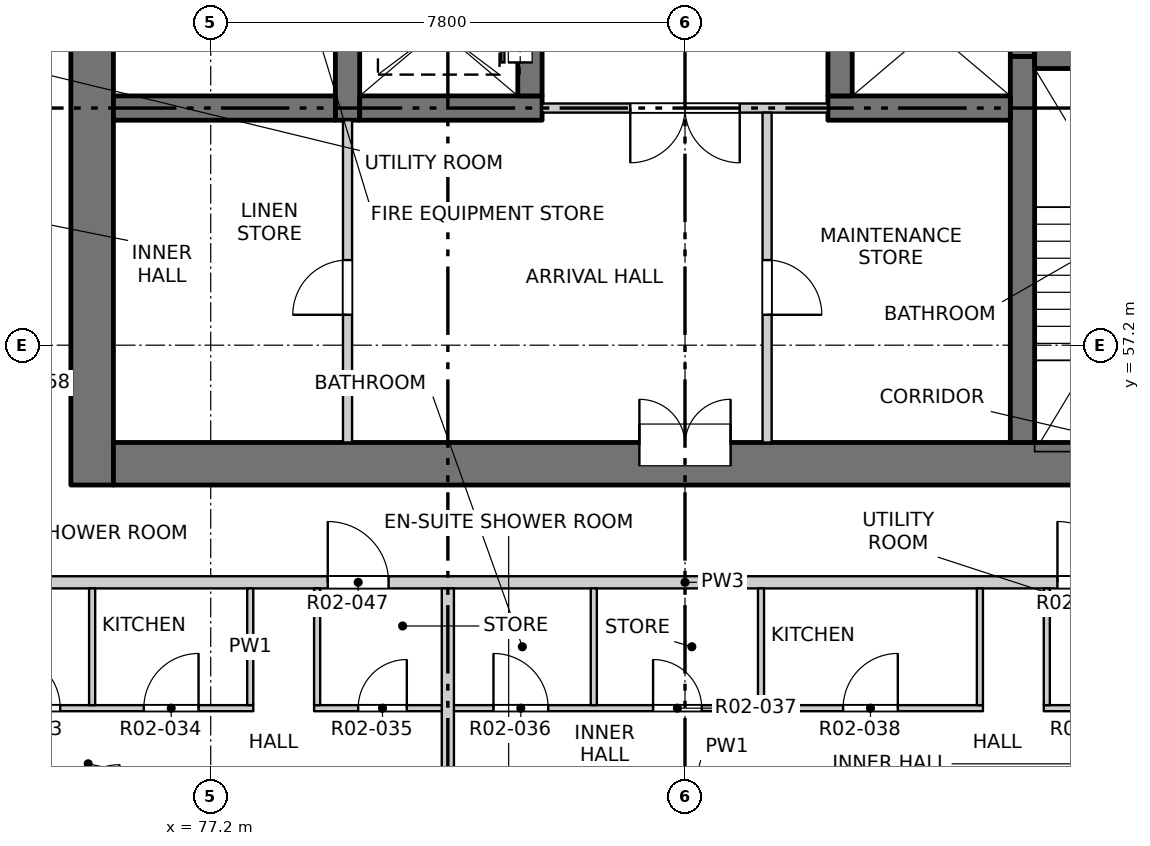
"""IFC4 building model, lengths in metres.
Left out: names, types, materials, properties, quantities, classifications, styles, units other than length and angle.
Written with IfcOpenShell. Run it as: python <this file> out.ifc"""

import sys

from ifc_helpers import new_model, si_unit, direction, frame, frame_2d, origin, place, context, subcontext, project, spatial, rectangle, extrude, element, fill, save


model = new_model("IFC4")
c1 = context("Model", 3, precision=1e-05, world=origin(), true_north=direction((0.0, 1.0)))
c2 = subcontext(c1, "Body", "Model", "MODEL_VIEW")
j1 = project(units=[si_unit("LENGTHUNIT", "METRE"), si_unit("PLANEANGLEUNIT", "RADIAN")], contexts=[c1])
p1 = place(None, origin())
s1 = spatial("IfcSite", under=j1, at=p1, CompositionType="ELEMENT")
p2 = place(p1, origin())
s2 = spatial("IfcBuilding", under=s1, at=p2, CompositionType="ELEMENT")
p3 = place(p2, frame((0.0, 0.0, 36.5)))
s3 = spatial("IfcBuildingStorey", under=s2, at=p3, CompositionType="ELEMENT", Elevation=36.5)
p4 = place(p3, frame((75.25, 54.9, -0.25), z_axis=(0.0, 0.0, 1.0), x_axis=(0.0, 1.0, 0.0)))
e1 = element("IfcWall", 1, at=p4, inside=s3, PredefinedType="SOLIDWALL", context=c2, shape_type="SweptSolid", body=[
    extrude(rectangle(XDim=22.4, YDim=0.7, at=frame_2d((11.2, 0.0))), origin(), (0.0, 0.0, 1.0), 3.4),
])
p5 = place(p4, frame((7.55, 0.0, 0.25)))
e2 = element("IfcOpeningElement", 2, at=p5, cuts=e1, PredefinedType="OPENING", context=c2, shape_type="SweptSolid", body=[
    extrude(rectangle(XDim=0.9, YDim=2.1, at=frame_2d((0.45, 1.05))), frame((0.0, 0.36, 0.0), z_axis=(0.0, -1.0, 0.0), x_axis=(1.0, 0.0, 0.0)), (0.0, 0.0, 1.0), 0.72),
])
p6 = place(p4, frame((10.85, 0.0, 0.25)))
e3 = element("IfcOpeningElement", 3, at=p6, cuts=e1, PredefinedType="OPENING", context=c2, shape_type="SweptSolid", body=[
    extrude(rectangle(XDim=0.9, YDim=2.1, at=frame_2d((0.45, 1.05))), frame((0.0, 0.36, 0.0), z_axis=(0.0, -1.0, 0.0), x_axis=(1.0, 0.0, 0.0)), (0.0, 0.0, 1.0), 0.72),
])
p7 = place(p4, frame((13.85, 0.0, 0.25)))
e4 = element("IfcOpeningElement", 4, at=p7, cuts=e1, PredefinedType="OPENING", context=c2, shape_type="SweptSolid", body=[
    extrude(rectangle(XDim=0.9, YDim=2.1, at=frame_2d((0.45, 1.05))), frame((0.0, 0.36, 0.0), z_axis=(0.0, -1.0, 0.0), x_axis=(1.0, 0.0, 0.0)), (0.0, 0.0, 1.0), 0.72),
])
p8 = place(p4, frame((16.85, 0.0, 0.25)))
e5 = element("IfcOpeningElement", 5, at=p8, cuts=e1, PredefinedType="OPENING", context=c2, shape_type="SweptSolid", body=[
    extrude(rectangle(XDim=0.9, YDim=2.1, at=frame_2d((0.45, 1.05))), frame((0.0, 0.36, 0.0), z_axis=(0.0, -1.0, 0.0), x_axis=(1.0, 0.0, 0.0)), (0.0, 0.0, 1.0), 0.72),
])
p9 = place(p4, frame((20.15, 0.0, 0.25)))
e6 = element("IfcOpeningElement", 6, at=p9, cuts=e1, PredefinedType="OPENING", context=c2, shape_type="SweptSolid", body=[
    extrude(rectangle(XDim=0.9, YDim=2.1, at=frame_2d((0.45, 1.05))), frame((0.0, 0.36, 0.0), z_axis=(0.0, -1.0, 0.0), x_axis=(1.0, 0.0, 0.0)), (0.0, 0.0, 1.0), 0.72),
])
p10 = place(p3, frame((75.6, 55.25, -0.25), z_axis=(0.0, 0.0, 1.0), x_axis=(1.0, 0.0, 0.0)))
e7 = element("IfcWall", 7, at=p10, inside=s3, PredefinedType="SOLIDWALL", context=c2, shape_type="SweptSolid", body=[
    extrude(rectangle(XDim=18.8, YDim=0.7, at=frame_2d((9.4, 0.0))), origin(), (0.0, 0.0, 1.0), 3.4),
])
p11 = place(p10, frame((8.65, 0.0, 0.25)))
e8 = element("IfcOpeningElement", 8, at=p11, cuts=e7, PredefinedType="OPENING", context=c2, shape_type="SweptSolid", body=[
    extrude(rectangle(XDim=1.5, YDim=2.1, at=frame_2d((0.75, 1.05))), frame((0.0, 0.36, 0.0), z_axis=(0.0, -1.0, 0.0), x_axis=(1.0, 0.0, 0.0)), (0.0, 0.0, 1.0), 0.72),
])
p12 = place(p3, frame((79.45, 60.9, -0.25), z_axis=(0.0, 0.0, 1.0), x_axis=(0.0, 1.0, 0.0)))
e9 = element("IfcWall", 9, at=p12, inside=s3, PredefinedType="SOLIDWALL", context=c2, shape_type="SweptSolid", body=[
    extrude(rectangle(XDim=16.4, YDim=0.4, at=frame_2d((8.2, 0.0))), origin(), (0.0, 0.0, 1.0), 3.4),
])
p13 = place(p3, frame((90.55, 55.6, -0.25), z_axis=(0.0, 0.0, 1.0), x_axis=(0.0, 1.0, 0.0)))
e10 = element("IfcWall", 10, at=p13, inside=s3, PredefinedType="SOLIDWALL", context=c2, shape_type="SweptSolid", body=[
    extrude(rectangle(XDim=6.35, YDim=0.4, at=frame_2d((3.175, 0.0))), origin(), (0.0, 0.0, 1.0), 3.4),
])
p14 = place(p3, frame((90.55, 61.95, -0.25), z_axis=(0.0, 0.0, 1.0), x_axis=(0.0, 1.0, 0.0)))
e11 = element("IfcWall", 11, at=p14, inside=s3, PredefinedType="SOLIDWALL", context=c2, shape_type="SweptSolid", body=[
    extrude(rectangle(XDim=15.35, YDim=0.4, at=frame_2d((7.675, 0.0))), origin(), (0.0, 0.0, 1.0), 3.4),
])
p15 = place(p3, frame((79.65, 61.1, -0.25), z_axis=(0.0, 0.0, 1.0), x_axis=(1.0, 0.0, 0.0)))
e12 = element("IfcWall", 12, at=p15, inside=s3, PredefinedType="SOLIDWALL", context=c2, shape_type="SweptSolid", body=[
    extrude(rectangle(XDim=3.0, YDim=0.4, at=frame_2d((1.5, 0.0))), origin(), (0.0, 0.0, 1.0), 3.4),
])
p16 = place(p3, frame((82.45, 61.3, -0.25), z_axis=(0.0, 0.0, 1.0), x_axis=(0.0, 1.0, 0.0)))
e13 = element("IfcWall", 13, at=p16, inside=s3, PredefinedType="SOLIDWALL", context=c2, shape_type="SweptSolid", body=[
    extrude(rectangle(XDim=2.2, YDim=0.4, at=frame_2d((1.1, 0.0))), origin(), (0.0, 0.0, 1.0), 3.4),
])
p17 = place(p16, frame((0.55, 0.0, 0.25)))
e14 = element("IfcOpeningElement", 14, at=p17, cuts=e13, PredefinedType="OPENING", context=c2, shape_type="SweptSolid", body=[
    extrude(rectangle(XDim=1.1, YDim=2.1, at=frame_2d((0.55, 1.05))), frame((0.0, 0.21, 0.0), z_axis=(0.0, -1.0, 0.0), x_axis=(1.0, 0.0, 0.0)), (0.0, 0.0, 1.0), 0.42),
])
p18 = place(p3, frame((87.35, 61.1, -0.25), z_axis=(0.0, 0.0, 1.0), x_axis=(1.0, 0.0, 0.0)))
e15 = element("IfcWall", 15, at=p18, inside=s3, PredefinedType="SOLIDWALL", context=c2, shape_type="SweptSolid", body=[
    extrude(rectangle(XDim=3.0, YDim=0.4, at=frame_2d((1.5, 0.0))), origin(), (0.0, 0.0, 1.0), 3.4),
])
p19 = place(p3, frame((87.55, 61.3, -0.25), z_axis=(0.0, 0.0, 1.0), x_axis=(0.0, 1.0, 0.0)))
e16 = element("IfcWall", 16, at=p19, inside=s3, PredefinedType="SOLIDWALL", context=c2, shape_type="SweptSolid", body=[
    extrude(rectangle(XDim=2.2, YDim=0.4, at=frame_2d((1.1, 0.0))), origin(), (0.0, 0.0, 1.0), 3.4),
])
for number, where, z_axis, x_axis in (
    (17, (75.6, 61.1, -0.25), (0.0, 0.0, 1.0), (1.0, 0.0, 0.0)),
    (18, (90.75, 61.95, -0.25), (0.0, 0.0, 1.0), (1.0, 0.0, 0.0)),
):
    element("IfcWall", number, at=place(p3, frame(where, z_axis=z_axis, x_axis=x_axis)), inside=s3, PredefinedType="SOLIDWALL", context=c2, shape_type="SweptSolid", body=[
        extrude(rectangle(XDim=3.65, YDim=0.4, at=frame_2d((1.825, 0.0))), origin(), (0.0, 0.0, 1.0), 3.4),
    ])
p20 = place(p3, frame((73.2, 51.23, 0.0), z_axis=(0.0, 0.0, 1.0), x_axis=(1.0, 0.0, 0.0)))
e19 = element("IfcWall", 19, at=p20, inside=s3, PredefinedType="PARTITIONING", context=c2, shape_type="SweptSolid", body=[
    extrude(rectangle(XDim=4.7, YDim=0.1, at=frame_2d((2.35, 0.0))), origin(), (0.0, 0.0, 1.0), 3.15),
])
p21 = place(p20, frame((0.625, 0.0, 0.0)))
e20 = element("IfcOpeningElement", 20, at=p21, cuts=e19, PredefinedType="OPENING", context=c2, shape_type="SweptSolid", body=[
    extrude(rectangle(XDim=0.9, YDim=2.1, at=frame_2d((0.45, 1.05))), frame((0.0, 0.06, 0.0), z_axis=(0.0, -1.0, 0.0), x_axis=(1.0, 0.0, 0.0)), (0.0, 0.0, 1.0), 0.12),
])
p22 = place(p20, frame((2.9, 0.0, 0.0)))
e21 = element("IfcOpeningElement", 21, at=p22, cuts=e19, PredefinedType="OPENING", context=c2, shape_type="SweptSolid", body=[
    extrude(rectangle(XDim=0.9, YDim=2.1, at=frame_2d((0.45, 1.05))), frame((0.0, 0.06, 0.0), z_axis=(0.0, -1.0, 0.0), x_axis=(1.0, 0.0, 0.0)), (0.0, 0.0, 1.0), 0.12),
])
p23 = place(p3, frame((78.9, 51.23, 0.0), z_axis=(0.0, 0.0, 1.0), x_axis=(1.0, 0.0, 0.0)))
e22 = element("IfcWall", 22, at=p23, inside=s3, PredefinedType="PARTITIONING", context=c2, shape_type="SweptSolid", body=[
    extrude(rectangle(XDim=11.0, YDim=0.1, at=frame_2d((5.5, 0.0))), origin(), (0.0, 0.0, 1.0), 3.15),
])
p24 = place(p23, frame((0.725, 0.0, 0.0)))
e23 = element("IfcOpeningElement", 23, at=p24, cuts=e22, PredefinedType="OPENING", context=c2, shape_type="SweptSolid", body=[
    extrude(rectangle(XDim=0.8, YDim=2.1, at=frame_2d((0.4, 1.05))), frame((0.0, 0.06, 0.0), z_axis=(0.0, -1.0, 0.0), x_axis=(1.0, 0.0, 0.0)), (0.0, 0.0, 1.0), 0.12),
])
p25 = place(p23, frame((2.95, 0.0, 0.0)))
e24 = element("IfcOpeningElement", 24, at=p25, cuts=e22, PredefinedType="OPENING", context=c2, shape_type="SweptSolid", body=[
    extrude(rectangle(XDim=0.9, YDim=2.1, at=frame_2d((0.45, 1.05))), frame((0.0, 0.06, 0.0), z_axis=(0.0, -1.0, 0.0), x_axis=(1.0, 0.0, 0.0)), (0.0, 0.0, 1.0), 0.12),
])
p26 = place(p23, frame((5.575, 0.0, 0.0)))
e25 = element("IfcOpeningElement", 25, at=p26, cuts=e22, PredefinedType="OPENING", context=c2, shape_type="SweptSolid", body=[
    extrude(rectangle(XDim=0.8, YDim=2.1, at=frame_2d((0.4, 1.05))), frame((0.0, 0.06, 0.0), z_axis=(0.0, -1.0, 0.0), x_axis=(1.0, 0.0, 0.0)), (0.0, 0.0, 1.0), 0.12),
])
p27 = place(p23, frame((8.7, 0.0, 0.0)))
e26 = element("IfcOpeningElement", 26, at=p27, cuts=e22, PredefinedType="OPENING", context=c2, shape_type="SweptSolid", body=[
    extrude(rectangle(XDim=0.9, YDim=2.1, at=frame_2d((0.45, 1.05))), frame((0.0, 0.06, 0.0), z_axis=(0.0, -1.0, 0.0), x_axis=(1.0, 0.0, 0.0)), (0.0, 0.0, 1.0), 0.12),
])
p28 = place(p3, frame((90.9, 51.23, 0.0), z_axis=(0.0, 0.0, 1.0), x_axis=(1.0, 0.0, 0.0)))
e27 = element("IfcWall", 27, at=p28, inside=s3, PredefinedType="PARTITIONING", context=c2, shape_type="SweptSolid", body=[
    extrude(rectangle(XDim=5.9, YDim=0.1, at=frame_2d((2.95, 0.0))), origin(), (0.0, 0.0, 1.0), 3.15),
])
p29 = place(p28, frame((0.5, 0.0, 0.0)))
e28 = element("IfcOpeningElement", 28, at=p29, cuts=e27, PredefinedType="OPENING", context=c2, shape_type="SweptSolid", body=[
    extrude(rectangle(XDim=0.9, YDim=2.1, at=frame_2d((0.45, 1.05))), frame((0.0, 0.06, 0.0), z_axis=(0.0, -1.0, 0.0), x_axis=(1.0, 0.0, 0.0)), (0.0, 0.0, 1.0), 0.12),
])
p30 = place(p28, frame((2.375, 0.0, 0.0)))
e29 = element("IfcOpeningElement", 29, at=p30, cuts=e27, PredefinedType="OPENING", context=c2, shape_type="SweptSolid", body=[
    extrude(rectangle(XDim=0.8, YDim=2.1, at=frame_2d((0.4, 1.05))), frame((0.0, 0.06, 0.0), z_axis=(0.0, -1.0, 0.0), x_axis=(1.0, 0.0, 0.0)), (0.0, 0.0, 1.0), 0.12),
])
p31 = place(p28, frame((4.35, 0.0, 0.0)))
e30 = element("IfcOpeningElement", 30, at=p31, cuts=e27, PredefinedType="OPENING", context=c2, shape_type="SweptSolid", body=[
    extrude(rectangle(XDim=0.8, YDim=2.1, at=frame_2d((0.4, 1.05))), frame((0.0, 0.06, 0.0), z_axis=(0.0, -1.0, 0.0), x_axis=(1.0, 0.0, 0.0)), (0.0, 0.0, 1.0), 0.12),
])
p32 = place(p3, frame((73.2, 53.3, 0.0), z_axis=(0.0, 0.0, 1.0), x_axis=(1.0, 0.0, 0.0)))
e31 = element("IfcWall", 31, at=p32, inside=s3, PredefinedType="PARTITIONING", context=c2, shape_type="SweptSolid", body=[
    extrude(rectangle(XDim=23.6, YDim=0.2, at=frame_2d((11.8, 0.0))), origin(), (0.0, 0.0, 1.0), 3.15),
])
p33 = place(p32, frame((5.925, 0.0, 0.0)))
e32 = element("IfcOpeningElement", 32, at=p33, cuts=e31, PredefinedType="OPENING", context=c2, shape_type="SweptSolid", body=[
    extrude(rectangle(XDim=1.0, YDim=2.1, at=frame_2d((0.5, 1.05))), frame((0.0, 0.11, 0.0), z_axis=(0.0, -1.0, 0.0), x_axis=(1.0, 0.0, 0.0)), (0.0, 0.0, 1.0), 0.22),
])
p34 = place(p32, frame((17.925, 0.0, 0.0)))
e33 = element("IfcOpeningElement", 33, at=p34, cuts=e31, PredefinedType="OPENING", context=c2, shape_type="SweptSolid", body=[
    extrude(rectangle(XDim=1.0, YDim=2.1, at=frame_2d((0.5, 1.05))), frame((0.0, 0.11, 0.0), z_axis=(0.0, -1.0, 0.0), x_axis=(1.0, 0.0, 0.0)), (0.0, 0.0, 1.0), 0.22),
])
p35 = place(p3, frame((82.65, 61.1, 0.0), z_axis=(0.0, 0.0, 1.0), x_axis=(1.0, 0.0, 0.0)))
e34 = element("IfcWall", 34, at=p35, inside=s3, PredefinedType="PARTITIONING", context=c2, shape_type="SweptSolid", body=[
    extrude(rectangle(XDim=4.7, YDim=0.15, at=frame_2d((2.35, 0.0))), origin(), (0.0, 0.0, 1.0), 3.15),
])
p36 = place(p35, frame((1.45, 0.0, 0.0)))
e35 = element("IfcOpeningElement", 35, at=p36, cuts=e34, PredefinedType="OPENING", context=c2, shape_type="SweptSolid", body=[
    extrude(rectangle(XDim=1.8, YDim=2.1, at=frame_2d((0.9, 1.05))), frame((0.0, 0.085, 0.0), z_axis=(0.0, -1.0, 0.0), x_axis=(1.0, 0.0, 0.0)), (0.0, 0.0, 1.0), 0.17),
])
for number, where, z_axis, x_axis in (
    (36, (75.25, 51.28, 0.0), (0.0, 0.0, 1.0), (0.0, 1.0, 0.0)),
    (37, (77.85, 51.28, 0.0), (0.0, 0.0, 1.0), (0.0, 1.0, 0.0)),
    (38, (78.95, 51.28, 0.0), (0.0, 0.0, 1.0), (0.0, 1.0, 0.0)),
):
    element("IfcWall", number, at=place(p3, frame(where, z_axis=z_axis, x_axis=x_axis)), inside=s3, PredefinedType="PARTITIONING", context=c2, shape_type="SweptSolid", body=[
        extrude(rectangle(XDim=1.92, YDim=0.1, at=frame_2d((0.96, 0.0))), origin(), (0.0, 0.0, 1.0), 3.15),
    ])
p37 = place(p3, frame((79.45, 55.6, 0.0), z_axis=(0.0, 0.0, 1.0), x_axis=(0.0, 1.0, 0.0)))
e39 = element("IfcWall", 39, at=p37, inside=s3, PredefinedType="PARTITIONING", context=c2, shape_type="SweptSolid", body=[
    extrude(rectangle(XDim=5.3, YDim=0.15, at=frame_2d((2.65, 0.0))), origin(), (0.0, 0.0, 1.0), 3.15),
])
p38 = place(p37, frame((2.1, 0.0, 0.0)))
e40 = element("IfcOpeningElement", 40, at=p38, cuts=e39, PredefinedType="OPENING", context=c2, shape_type="SweptSolid", body=[
    extrude(rectangle(XDim=0.9, YDim=2.1, at=frame_2d((0.45, 1.05))), frame((0.0, 0.085, 0.0), z_axis=(0.0, -1.0, 0.0), x_axis=(1.0, 0.0, 0.0)), (0.0, 0.0, 1.0), 0.17),
])
p39 = place(p3, frame((81.1, 41.9, 0.0), z_axis=(0.0, 0.0, 1.0), x_axis=(0.0, 1.0, 0.0)))
e41 = element("IfcWall", 41, at=p39, inside=s3, PredefinedType="PARTITIONING", context=c2, shape_type="SweptSolid", body=[
    extrude(rectangle(XDim=11.3, YDim=0.2, at=frame_2d((5.65, 0.0))), origin(), (0.0, 0.0, 1.0), 3.15),
])
for number, where, z_axis, x_axis in (
    (42, (83.5, 51.28, 0.0), (0.0, 0.0, 1.0), (0.0, 1.0, 0.0)),
    (43, (86.25, 51.28, 0.0), (0.0, 0.0, 1.0), (0.0, 1.0, 0.0)),
):
    element("IfcWall", number, at=place(p3, frame(where, z_axis=z_axis, x_axis=x_axis)), inside=s3, PredefinedType="PARTITIONING", context=c2, shape_type="SweptSolid", body=[
        extrude(rectangle(XDim=1.92, YDim=0.1, at=frame_2d((0.96, 0.0))), origin(), (0.0, 0.0, 1.0), 3.15),
    ])
p40 = place(p3, frame((86.35, 55.6, 0.0), z_axis=(0.0, 0.0, 1.0), x_axis=(0.0, 1.0, 0.0)))
e44 = element("IfcWall", 44, at=p40, inside=s3, PredefinedType="PARTITIONING", context=c2, shape_type="SweptSolid", body=[
    extrude(rectangle(XDim=5.425, YDim=0.15, at=frame_2d((2.712, 0.0))), origin(), (0.0, 0.0, 1.0), 3.15),
])
p41 = place(p40, frame((2.1, 0.0, 0.0)))
e45 = element("IfcOpeningElement", 45, at=p41, cuts=e44, PredefinedType="OPENING", context=c2, shape_type="SweptSolid", body=[
    extrude(rectangle(XDim=0.9, YDim=2.1, at=frame_2d((0.45, 1.05))), frame((0.0, 0.085, 0.0), z_axis=(0.0, -1.0, 0.0), x_axis=(1.0, 0.0, 0.0)), (0.0, 0.0, 1.0), 0.17),
])
for number, where, z_axis, x_axis in (
    (46, (89.85, 51.28, 0.0), (0.0, 0.0, 1.0), (0.0, 1.0, 0.0)),
    (47, (90.95, 51.28, 0.0), (0.0, 0.0, 1.0), (0.0, 1.0, 0.0)),
):
    element("IfcWall", number, at=place(p3, frame(where, z_axis=z_axis, x_axis=x_axis)), inside=s3, PredefinedType="PARTITIONING", context=c2, shape_type="SweptSolid", body=[
        extrude(rectangle(XDim=1.92, YDim=0.1, at=frame_2d((0.96, 0.0))), origin(), (0.0, 0.0, 1.0), 3.15),
    ])
p42 = place(p21, origin())
e48 = element("IfcDoor", 48, at=p42, inside=s3, OperationType="SINGLE_SWING_LEFT", PredefinedType="DOOR", context=c2, shape_type="SweptSolid", body=[
    extrude(rectangle(XDim=0.9, YDim=2.1, at=frame_2d((0.45, 1.05))), frame((0.0, 0.025, 0.0), z_axis=(0.0, -1.0, 0.0), x_axis=(1.0, 0.0, 0.0)), (0.0, 0.0, 1.0), 0.05),
])
fill(e20, e48)
p43 = place(p22, origin())
e49 = element("IfcDoor", 49, at=p43, inside=s3, OperationType="SINGLE_SWING_RIGHT", PredefinedType="DOOR", context=c2, shape_type="SweptSolid", body=[
    extrude(rectangle(XDim=0.9, YDim=2.1, at=frame_2d((0.45, 1.05))), frame((0.0, 0.025, 0.0), z_axis=(0.0, -1.0, 0.0), x_axis=(1.0, 0.0, 0.0)), (0.0, 0.0, 1.0), 0.05),
])
fill(e21, e49)
p44 = place(p24, origin())
e50 = element("IfcDoor", 50, at=p44, inside=s3, OperationType="SINGLE_SWING_RIGHT", PredefinedType="DOOR", context=c2, shape_type="SweptSolid", body=[
    extrude(rectangle(XDim=0.8, YDim=2.1, at=frame_2d((0.4, 1.05))), frame((0.0, 0.025, 0.0), z_axis=(0.0, -1.0, 0.0), x_axis=(1.0, 0.0, 0.0)), (0.0, 0.0, 1.0), 0.05),
])
fill(e23, e50)
p45 = place(p25, origin())
e51 = element("IfcDoor", 51, at=p45, inside=s3, OperationType="SINGLE_SWING_LEFT", PredefinedType="DOOR", context=c2, shape_type="SweptSolid", body=[
    extrude(rectangle(XDim=0.9, YDim=2.1, at=frame_2d((0.45, 1.05))), frame((0.0, 0.025, 0.0), z_axis=(0.0, -1.0, 0.0), x_axis=(1.0, 0.0, 0.0)), (0.0, 0.0, 1.0), 0.05),
])
fill(e24, e51)
p46 = place(p26, origin())
e52 = element("IfcDoor", 52, at=p46, inside=s3, OperationType="SINGLE_SWING_LEFT", PredefinedType="DOOR", context=c2, shape_type="SweptSolid", body=[
    extrude(rectangle(XDim=0.8, YDim=2.1, at=frame_2d((0.4, 1.05))), frame((0.0, 0.025, 0.0), z_axis=(0.0, -1.0, 0.0), x_axis=(1.0, 0.0, 0.0)), (0.0, 0.0, 1.0), 0.05),
])
fill(e25, e52)
p47 = place(p27, origin())
e53 = element("IfcDoor", 53, at=p47, inside=s3, OperationType="SINGLE_SWING_RIGHT", PredefinedType="DOOR", context=c2, shape_type="SweptSolid", body=[
    extrude(rectangle(XDim=0.9, YDim=2.1, at=frame_2d((0.45, 1.05))), frame((0.0, 0.025, 0.0), z_axis=(0.0, -1.0, 0.0), x_axis=(1.0, 0.0, 0.0)), (0.0, 0.0, 1.0), 0.05),
])
fill(e26, e53)
p48 = place(p33, origin())
e54 = element("IfcDoor", 54, at=p48, inside=s3, OperationType="SINGLE_SWING_LEFT", PredefinedType="DOOR", context=c2, shape_type="SweptSolid", body=[
    extrude(rectangle(XDim=1.0, YDim=2.1, at=frame_2d((0.5, 1.05))), frame((0.0, 0.025, 0.0), z_axis=(0.0, -1.0, 0.0), x_axis=(1.0, 0.0, 0.0)), (0.0, 0.0, 1.0), 0.05),
])
fill(e32, e54)
p49 = place(p34, origin())
e55 = element("IfcDoor", 55, at=p49, inside=s3, OperationType="SINGLE_SWING_LEFT", PredefinedType="DOOR", context=c2, shape_type="SweptSolid", body=[
    extrude(rectangle(XDim=1.0, YDim=2.1, at=frame_2d((0.5, 1.05))), frame((0.0, 0.025, 0.0), z_axis=(0.0, -1.0, 0.0), x_axis=(1.0, 0.0, 0.0)), (0.0, 0.0, 1.0), 0.05),
])
fill(e33, e55)
p50 = place(p11, origin())
e56 = element("IfcDoor", 56, at=p50, inside=s3, OperationType="DOUBLE_DOOR_SINGLE_SWING", PredefinedType="DOOR", context=c2, shape_type="SweptSolid", body=[
    extrude(rectangle(XDim=1.5, YDim=2.1, at=frame_2d((0.75, 1.05))), frame((0.0, 0.335, 0.0), z_axis=(0.0, -1.0, 0.0), x_axis=(1.0, 0.0, 0.0)), (0.0, 0.0, 1.0), 0.05),
])
fill(e8, e56)
p51 = place(p38, origin())
e57 = element("IfcDoor", 57, at=p51, inside=s3, OperationType="SINGLE_SWING_LEFT", PredefinedType="DOOR", context=c2, shape_type="SweptSolid", body=[
    extrude(rectangle(XDim=0.9, YDim=2.1, at=frame_2d((0.45, 1.05))), frame((0.0, 0.025, 0.0), z_axis=(0.0, -1.0, 0.0), x_axis=(1.0, 0.0, 0.0)), (0.0, 0.0, 1.0), 0.05),
])
fill(e40, e57)
p52 = place(p41, origin())
e58 = element("IfcDoor", 58, at=p52, inside=s3, OperationType="SINGLE_SWING_RIGHT", PredefinedType="DOOR", context=c2, shape_type="SweptSolid", body=[
    extrude(rectangle(XDim=0.9, YDim=2.1, at=frame_2d((0.45, 1.05))), frame((0.0, 0.025, 0.0), z_axis=(0.0, -1.0, 0.0), x_axis=(1.0, 0.0, 0.0)), (0.0, 0.0, 1.0), 0.05),
])
fill(e45, e58)
p53 = place(p36, origin())
e59 = element("IfcDoor", 59, at=p53, inside=s3, OperationType="DOUBLE_DOOR_SINGLE_SWING", PredefinedType="DOOR", context=c2, shape_type="SweptSolid", body=[
    extrude(rectangle(XDim=1.8, YDim=2.1, at=frame_2d((0.9, 1.05))), frame((0.0, 0.025, 0.0), z_axis=(0.0, -1.0, 0.0), x_axis=(1.0, 0.0, 0.0)), (0.0, 0.0, 1.0), 0.05),
])
fill(e35, e59)
p54 = place(p17, origin())
e60 = element("IfcDoor", 60, at=p54, inside=s3, OperationType="SLIDING_TO_RIGHT", PredefinedType="DOOR", context=c2, shape_type="SweptSolid", body=[
    extrude(rectangle(XDim=1.1, YDim=2.1, at=frame_2d((0.55, 1.05))), frame((0.0, 0.185, 0.0), z_axis=(0.0, -1.0, 0.0), x_axis=(1.0, 0.0, 0.0)), (0.0, 0.0, 1.0), 0.05),
])
fill(e14, e60)
save(model, sys.argv[1])
